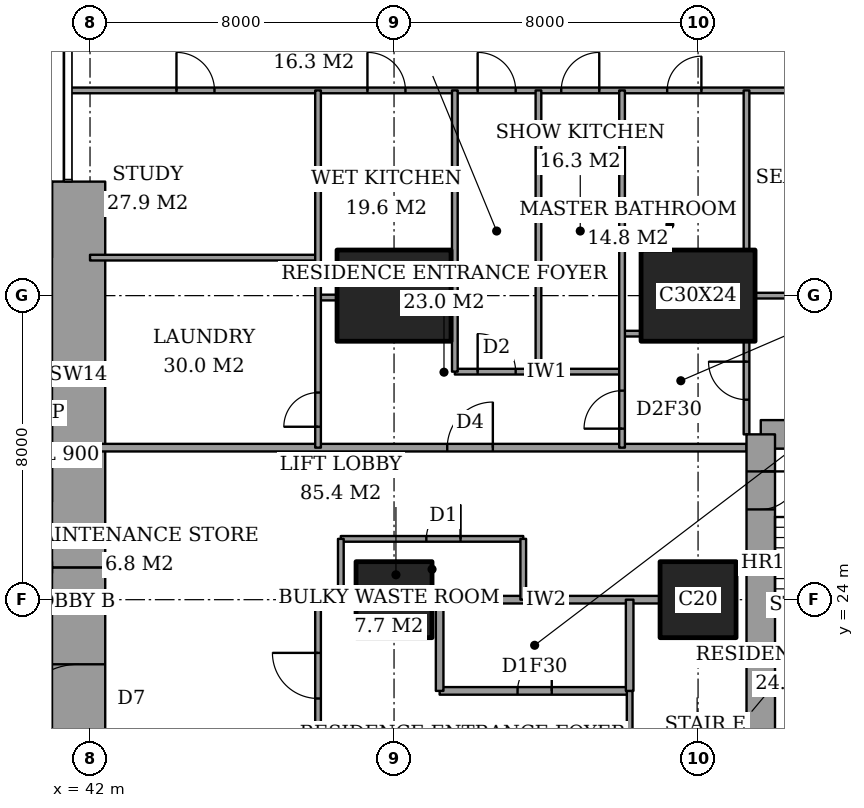
"""IFC4 building model, lengths in metres.
Left out: names, types, materials, properties, quantities, classifications, styles, units other than length and angle.
Written with IfcOpenShell. Run it as: python <this file> out.ifc"""

import sys

from ifc_helpers import new_model, si_unit, direction, frame, frame_2d, origin, origin_2d, place, context, subcontext, project, spatial, rectangle, extrude, element, fill, save


model = new_model("IFC4")
c1 = context("Model", 3, precision=1e-05, world=origin(), true_north=direction((0.0, 1.0)))
c2 = subcontext(c1, "Body", "Model", "MODEL_VIEW")
j1 = project(units=[si_unit("LENGTHUNIT", "METRE"), si_unit("PLANEANGLEUNIT", "RADIAN")], contexts=[c1])
p1 = place(None, origin())
s1 = spatial("IfcSite", under=j1, at=p1, CompositionType="ELEMENT")
p2 = place(p1, origin())
s2 = spatial("IfcBuilding", under=s1, at=p2, CompositionType="ELEMENT")
p3 = place(p2, frame((0.0, 0.0, 107.0)))
s3 = spatial("IfcBuildingStorey", under=s2, at=p3, CompositionType="ELEMENT", Elevation=107.0)
p4 = place(p3, frame((50.0, 24.0, 0.0), z_axis=(0.0, 0.0, 1.0), x_axis=(1.0, 0.0, 0.0)))
e1 = element("IfcColumn", 1, at=p4, inside=s3, PredefinedType="COLUMN", context=c2, shape_type="SweptSolid", body=[
    extrude(rectangle(XDim=2.0, YDim=2.0, at=origin_2d()), origin(), (0.0, 0.0, 1.0), 3.6),
])
p5 = place(p3, frame((50.0, 32.0, 0.0), z_axis=(0.0, 0.0, 1.0), x_axis=(1.0, 0.0, 0.0)))
e2 = element("IfcColumn", 2, at=p5, inside=s3, PredefinedType="COLUMN", context=c2, shape_type="SweptSolid", body=[
    extrude(rectangle(XDim=3.0, YDim=2.4, at=origin_2d()), origin(), (0.0, 0.0, 1.0), 3.6),
])
p6 = place(p3, frame((58.0, 24.0, 0.0), z_axis=(0.0, 0.0, 1.0), x_axis=(1.0, 0.0, 0.0)))
e3 = element("IfcColumn", 3, at=p6, inside=s3, PredefinedType="COLUMN", context=c2, shape_type="SweptSolid", body=[
    extrude(rectangle(XDim=2.0, YDim=2.0, at=origin_2d()), origin(), (0.0, 0.0, 1.0), 3.6),
])
p7 = place(p3, frame((58.0, 32.0, 0.0), z_axis=(0.0, 0.0, 1.0), x_axis=(1.0, 0.0, 0.0)))
e4 = element("IfcColumn", 4, at=p7, inside=s3, PredefinedType="COLUMN", context=c2, shape_type="SweptSolid", body=[
    extrude(rectangle(XDim=3.0, YDim=2.4, at=origin_2d()), origin(), (0.0, 0.0, 1.0), 3.6),
])
p8 = place(p3, frame((41.7, 13.0, 0.0), z_axis=(0.0, 0.0, 1.0), x_axis=(0.0, 1.0, 0.0)))
e5 = element("IfcWall", 5, at=p8, inside=s3, PredefinedType="SHEAR", context=c2, shape_type="SweptSolid", body=[
    extrude(rectangle(XDim=11.85, YDim=1.4, at=frame_2d((5.925, 0.0))), origin(), (0.0, 0.0, 1.0), 3.6),
])
p9 = place(p8, frame((7.5, 0.0, 0.0)))
e6 = element("IfcOpeningElement", 6, at=p9, cuts=e5, PredefinedType="OPENING", context=c2, shape_type="SweptSolid", body=[
    extrude(rectangle(XDim=1.8, YDim=2.4, at=frame_2d((0.9, 1.2))), frame((0.0, 0.71, 0.0), z_axis=(0.0, -1.0, 0.0), x_axis=(1.0, 0.0, 0.0)), (0.0, 0.0, 1.0), 1.42),
])
p10 = place(p3, frame((41.7, 24.85, 0.0), z_axis=(0.0, 0.0, 1.0), x_axis=(0.0, 1.0, 0.0)))
e7 = element("IfcWall", 7, at=p10, inside=s3, PredefinedType="SHEAR", context=c2, shape_type="SweptSolid", body=[
    extrude(rectangle(XDim=10.15, YDim=1.4, at=frame_2d((5.075, 0.0))), origin(), (0.0, 0.0, 1.0), 3.6),
])
p11 = place(p3, frame((64.1, 28.35, 0.0), z_axis=(0.0, 0.0, 1.0), x_axis=(-1.0, 0.0, 0.0)))
e8 = element("IfcWall", 8, at=p11, inside=s3, PredefinedType="SHEAR", context=c2, shape_type="SweptSolid", body=[
    extrude(rectangle(XDim=4.45, YDim=0.75, at=frame_2d((2.225, 0.0))), origin(), (0.0, 0.0, 1.0), 3.6),
])
p12 = place(p3, frame((59.65, 28.35, 0.0), z_axis=(0.0, 0.0, 1.0), x_axis=(0.0, -1.0, 0.0)))
e9 = element("IfcWall", 9, at=p12, inside=s3, PredefinedType="SHEAR", context=c2, shape_type="SweptSolid", body=[
    extrude(rectangle(XDim=8.7, YDim=0.75, at=frame_2d((4.35, 0.0))), origin(), (0.0, 0.0, 1.0), 3.6),
])
p13 = place(p12, frame((0.975, 0.0, 0.0)))
e10 = element("IfcOpeningElement", 10, at=p13, cuts=e9, PredefinedType="OPENING", context=c2, shape_type="SweptSolid", body=[
    extrude(rectangle(XDim=1.0, YDim=2.1, at=frame_2d((0.5, 1.05))), frame((0.0, 0.385, 0.0), z_axis=(0.0, -1.0, 0.0), x_axis=(1.0, 0.0, 0.0)), (0.0, 0.0, 1.0), 0.77),
])
p14 = place(p3, frame((51.2, 21.6, 0.0), z_axis=(0.0, 0.0, 1.0), x_axis=(1.0, 0.0, 0.0)))
e11 = element("IfcWall", 11, at=p14, inside=s3, PredefinedType="PARTITIONING", context=c2, shape_type="SweptSolid", body=[
    extrude(rectangle(XDim=5.0, YDim=0.2, at=frame_2d((2.5, 0.0))), origin(), (0.0, 0.0, 1.0), 3.35),
])
p15 = place(p14, frame((2.05, 0.0, 0.0)))
e12 = element("IfcOpeningElement", 12, at=p15, cuts=e11, PredefinedType="OPENING", context=c2, shape_type="SweptSolid", body=[
    extrude(rectangle(XDim=0.9, YDim=2.1, at=frame_2d((0.45, 1.05))), frame((0.0, 0.11, 0.0), z_axis=(0.0, -1.0, 0.0), x_axis=(1.0, 0.0, 0.0)), (0.0, 0.0, 1.0), 0.22),
])
p16 = place(p3, frame((48.0, 24.0, 0.0), z_axis=(0.0, 0.0, 1.0), x_axis=(1.0, 0.0, 0.0)))
e13 = element("IfcWall", 13, at=p16, inside=s3, PredefinedType="PARTITIONING", context=c2, shape_type="SweptSolid", body=[
    extrude(rectangle(XDim=1.0, YDim=0.2, at=frame_2d((0.5, 0.0))), origin(), (0.0, 0.0, 1.0), 3.35),
])
p17 = place(p3, frame((51.0, 24.0, 0.0), z_axis=(0.0, 0.0, 1.0), x_axis=(1.0, 0.0, 0.0)))
e14 = element("IfcWall", 14, at=p17, inside=s3, PredefinedType="PARTITIONING", context=c2, shape_type="SweptSolid", body=[
    extrude(rectangle(XDim=6.0, YDim=0.2, at=frame_2d((3.0, 0.0))), origin(), (0.0, 0.0, 1.0), 3.35),
])
p18 = place(p3, frame((48.6, 25.6, 0.0), z_axis=(0.0, 0.0, 1.0), x_axis=(1.0, 0.0, 0.0)))
e15 = element("IfcWall", 15, at=p18, inside=s3, PredefinedType="PARTITIONING", context=c2, shape_type="SweptSolid", body=[
    extrude(rectangle(XDim=4.8, YDim=0.15, at=frame_2d((2.4, 0.0))), origin(), (0.0, 0.0, 1.0), 3.35),
])
p19 = place(p18, frame((2.25, 0.0, 0.0)))
e16 = element("IfcOpeningElement", 16, at=p19, cuts=e15, PredefinedType="OPENING", context=c2, shape_type="SweptSolid", body=[
    extrude(rectangle(XDim=0.9, YDim=2.1, at=frame_2d((0.45, 1.05))), frame((0.0, 0.085, 0.0), z_axis=(0.0, -1.0, 0.0), x_axis=(1.0, 0.0, 0.0)), (0.0, 0.0, 1.0), 0.17),
])
p20 = place(p3, frame((42.0, 28.0, 0.0), z_axis=(0.0, 0.0, 1.0), x_axis=(1.0, 0.0, 0.0)))
e17 = element("IfcWall", 17, at=p20, inside=s3, PredefinedType="PARTITIONING", context=c2, shape_type="SweptSolid", body=[
    extrude(rectangle(XDim=17.275, YDim=0.2, at=frame_2d((8.637, 0.0))), origin(), (0.0, 0.0, 1.0), 3.35),
])
p21 = place(p20, frame((9.4, 0.0, 0.0)))
e18 = element("IfcOpeningElement", 18, at=p21, cuts=e17, PredefinedType="OPENING", context=c2, shape_type="SweptSolid", body=[
    extrude(rectangle(XDim=1.2, YDim=2.4, at=frame_2d((0.6, 1.2))), frame((0.0, 0.11, 0.0), z_axis=(0.0, -1.0, 0.0), x_axis=(1.0, 0.0, 0.0)), (0.0, 0.0, 1.0), 0.22),
])
p22 = place(p3, frame((51.6, 30.0, 0.0), z_axis=(0.0, 0.0, 1.0), x_axis=(1.0, 0.0, 0.0)))
e19 = element("IfcWall", 19, at=p22, inside=s3, PredefinedType="PARTITIONING", context=c2, shape_type="SweptSolid", body=[
    extrude(rectangle(XDim=4.4, YDim=0.15, at=frame_2d((2.2, 0.0))), origin(), (0.0, 0.0, 1.0), 3.35),
])
p23 = place(p22, frame((0.6, 0.0, 0.0)))
e20 = element("IfcOpeningElement", 20, at=p23, cuts=e19, PredefinedType="OPENING", context=c2, shape_type="SweptSolid", body=[
    extrude(rectangle(XDim=1.0, YDim=2.1, at=frame_2d((0.5, 1.05))), frame((0.0, 0.085, 0.0), z_axis=(0.0, -1.0, 0.0), x_axis=(1.0, 0.0, 0.0)), (0.0, 0.0, 1.0), 0.17),
])
p24 = place(p3, frame((56.0, 31.0, 0.0), z_axis=(0.0, 0.0, 1.0), x_axis=(1.0, 0.0, 0.0)))
e21 = element("IfcWall", 21, at=p24, inside=s3, PredefinedType="PARTITIONING", context=c2, shape_type="SweptSolid", body=[
    extrude(rectangle(XDim=0.5, YDim=0.15, at=frame_2d((0.25, 0.0))), origin(), (0.0, 0.0, 1.0), 3.35),
])
p25 = place(p3, frame((48.0, 31.95, 0.0), z_axis=(0.0, 0.0, 1.0), x_axis=(1.0, 0.0, 0.0)))
e22 = element("IfcWall", 22, at=p25, inside=s3, PredefinedType="PARTITIONING", context=c2, shape_type="SweptSolid", body=[
    extrude(rectangle(XDim=0.5, YDim=0.15, at=frame_2d((0.25, 0.0))), origin(), (0.0, 0.0, 1.0), 2.634),
])
p26 = place(p3, frame((59.5, 32.0, 0.0), z_axis=(0.0, 0.0, 1.0), x_axis=(1.0, 0.0, 0.0)))
e23 = element("IfcWall", 23, at=p26, inside=s3, PredefinedType="PARTITIONING", context=c2, shape_type="SweptSolid", body=[
    extrude(rectangle(XDim=5.15, YDim=0.15, at=frame_2d((2.575, 0.0))), origin(), (0.0, 0.0, 1.0), 2.634),
])
p27 = place(p3, frame((42.0, 33.0, 0.0), z_axis=(0.0, 0.0, 1.0), x_axis=(1.0, 0.0, 0.0)))
e24 = element("IfcWall", 24, at=p27, inside=s3, PredefinedType="PARTITIONING", context=c2, shape_type="SweptSolid", body=[
    extrude(rectangle(XDim=6.0, YDim=0.15, at=frame_2d((3.0, 0.0))), origin(), (0.0, 0.0, 1.0), 3.35),
])
p28 = place(p3, frame((41.439, 37.4, 0.0), z_axis=(0.0, 0.0, 1.0), x_axis=(1.0, 0.0, 0.0)))
e25 = element("IfcWall", 25, at=p28, inside=s3, PredefinedType="PARTITIONING", context=c2, shape_type="SweptSolid", body=[
    extrude(rectangle(XDim=25.011, YDim=0.15, at=frame_2d((12.505, 0.0))), origin(), (0.0, 0.0, 1.0), 3.35),
])
p29 = place(p28, frame((10.761, 0.0, 0.0)))
e26 = element("IfcOpeningElement", 26, at=p29, cuts=e25, PredefinedType="OPENING", context=c2, shape_type="SweptSolid", body=[
    extrude(rectangle(XDim=1.0, YDim=2.1, at=frame_2d((0.5, 1.05))), frame((0.0, 0.085, 0.0), z_axis=(0.0, -1.0, 0.0), x_axis=(1.0, 0.0, 0.0)), (0.0, 0.0, 1.0), 0.17),
])
p30 = place(p28, frame((20.924, 0.0, 0.0)))
e27 = element("IfcOpeningElement", 27, at=p30, cuts=e25, PredefinedType="OPENING", context=c2, shape_type="SweptSolid", body=[
    extrude(rectangle(XDim=1.0, YDim=2.1, at=frame_2d((0.5, 1.05))), frame((0.0, 0.085, 0.0), z_axis=(0.0, -1.0, 0.0), x_axis=(1.0, 0.0, 0.0)), (0.0, 0.0, 1.0), 0.17),
])
p31 = place(p28, frame((15.749, 0.0, 0.0)))
e28 = element("IfcOpeningElement", 28, at=p31, cuts=e25, PredefinedType="OPENING", context=c2, shape_type="SweptSolid", body=[
    extrude(rectangle(XDim=0.9, YDim=2.1, at=frame_2d((0.45, 1.05))), frame((0.0, 0.085, 0.0), z_axis=(0.0, -1.0, 0.0), x_axis=(1.0, 0.0, 0.0)), (0.0, 0.0, 1.0), 0.17),
])
p32 = place(p28, frame((12.961, 0.0, 0.0)))
e29 = element("IfcOpeningElement", 29, at=p32, cuts=e25, PredefinedType="OPENING", context=c2, shape_type="SweptSolid", body=[
    extrude(rectangle(XDim=1.0, YDim=2.1, at=frame_2d((0.5, 1.05))), frame((0.0, 0.085, 0.0), z_axis=(0.0, -1.0, 0.0), x_axis=(1.0, 0.0, 0.0)), (0.0, 0.0, 1.0), 0.17),
])
p33 = place(p28, frame((7.861, 0.0, 0.0)))
e30 = element("IfcOpeningElement", 30, at=p33, cuts=e25, PredefinedType="OPENING", context=c2, shape_type="SweptSolid", body=[
    extrude(rectangle(XDim=1.0, YDim=2.1, at=frame_2d((0.5, 1.05))), frame((0.0, 0.085, 0.0), z_axis=(0.0, -1.0, 0.0), x_axis=(1.0, 0.0, 0.0)), (0.0, 0.0, 1.0), 0.17),
])
p34 = place(p28, frame((2.836, 0.0, 0.0)))
e31 = element("IfcOpeningElement", 31, at=p34, cuts=e25, PredefinedType="OPENING", context=c2, shape_type="SweptSolid", body=[
    extrude(rectangle(XDim=1.0, YDim=2.1, at=frame_2d((0.5, 1.05))), frame((0.0, 0.085, 0.0), z_axis=(0.0, -1.0, 0.0), x_axis=(1.0, 0.0, 0.0)), (0.0, 0.0, 1.0), 0.17),
])
p35 = place(p3, frame((48.0, 10.6, 0.0), z_axis=(0.0, 0.0, 1.0), x_axis=(0.0, 1.0, 0.0)))
e32 = element("IfcWall", 32, at=p35, inside=s3, PredefinedType="PARTITIONING", context=c2, shape_type="SweptSolid", body=[
    extrude(rectangle(XDim=13.4, YDim=0.15, at=frame_2d((6.7, 0.0))), origin(), (0.0, 0.0, 1.0), 3.35),
])
p36 = place(p35, frame((10.8, 0.0, 0.0)))
e33 = element("IfcOpeningElement", 33, at=p36, cuts=e32, PredefinedType="OPENING", context=c2, shape_type="SweptSolid", body=[
    extrude(rectangle(XDim=1.2, YDim=2.4, at=frame_2d((0.6, 1.2))), frame((0.0, 0.085, 0.0), z_axis=(0.0, -1.0, 0.0), x_axis=(1.0, 0.0, 0.0)), (0.0, 0.0, 1.0), 0.17),
])
p37 = place(p35, frame((6.7, 0.0, 0.0)))
e34 = element("IfcOpeningElement", 34, at=p37, cuts=e32, PredefinedType="OPENING", context=c2, shape_type="SweptSolid", body=[
    extrude(rectangle(XDim=0.9, YDim=2.1, at=frame_2d((0.45, 1.05))), frame((0.0, 0.085, 0.0), z_axis=(0.0, -1.0, 0.0), x_axis=(1.0, 0.0, 0.0)), (0.0, 0.0, 1.0), 0.17),
])
p38 = place(p3, frame((48.0, 28.0, 0.0), z_axis=(0.0, 0.0, 1.0), x_axis=(0.0, 1.0, 0.0)))
e35 = element("IfcWall", 35, at=p38, inside=s3, PredefinedType="PARTITIONING", context=c2, shape_type="SweptSolid", body=[
    extrude(rectangle(XDim=9.4, YDim=0.15, at=frame_2d((4.7, 0.0))), origin(), (0.0, 0.0, 1.0), 3.35),
])
p39 = place(p38, frame((0.55, 0.0, 0.0)))
e36 = element("IfcOpeningElement", 36, at=p39, cuts=e35, PredefinedType="OPENING", context=c2, shape_type="SweptSolid", body=[
    extrude(rectangle(XDim=0.9, YDim=2.1, at=frame_2d((0.45, 1.05))), frame((0.0, 0.085, 0.0), z_axis=(0.0, -1.0, 0.0), x_axis=(1.0, 0.0, 0.0)), (0.0, 0.0, 1.0), 0.17),
])
p40 = place(p3, frame((48.6, 24.0, 0.0), z_axis=(0.0, 0.0, 1.0), x_axis=(0.0, 1.0, 0.0)))
e37 = element("IfcWall", 37, at=p40, inside=s3, PredefinedType="PARTITIONING", context=c2, shape_type="SweptSolid", body=[
    extrude(rectangle(XDim=1.6, YDim=0.15, at=frame_2d((0.8, 0.0))), origin(), (0.0, 0.0, 1.0), 3.35),
])
p41 = place(p3, frame((51.2, 21.6, 0.0), z_axis=(0.0, 0.0, 1.0), x_axis=(0.0, 1.0, 0.0)))
e38 = element("IfcWall", 38, at=p41, inside=s3, PredefinedType="PARTITIONING", context=c2, shape_type="SweptSolid", body=[
    extrude(rectangle(XDim=2.4, YDim=0.2, at=frame_2d((1.2, 0.0))), origin(), (0.0, 0.0, 1.0), 3.35),
])
p42 = place(p3, frame((51.6, 30.0, 0.0), z_axis=(0.0, 0.0, 1.0), x_axis=(0.0, 1.0, 0.0)))
e39 = element("IfcWall", 39, at=p42, inside=s3, PredefinedType="PARTITIONING", context=c2, shape_type="SweptSolid", body=[
    extrude(rectangle(XDim=7.4, YDim=0.15, at=frame_2d((3.7, 0.0))), origin(), (0.0, 0.0, 1.0), 3.35),
])
p43 = place(p3, frame((53.4, 24.0, 0.0), z_axis=(0.0, 0.0, 1.0), x_axis=(0.0, 1.0, 0.0)))
e40 = element("IfcWall", 40, at=p43, inside=s3, PredefinedType="PARTITIONING", context=c2, shape_type="SweptSolid", body=[
    extrude(rectangle(XDim=1.6, YDim=0.15, at=frame_2d((0.8, 0.0))), origin(), (0.0, 0.0, 1.0), 3.35),
])
p44 = place(p3, frame((53.8, 30.0, 0.0), z_axis=(0.0, 0.0, 1.0), x_axis=(0.0, 1.0, 0.0)))
e41 = element("IfcWall", 41, at=p44, inside=s3, PredefinedType="PARTITIONING", context=c2, shape_type="SweptSolid", body=[
    extrude(rectangle(XDim=7.4, YDim=0.15, at=frame_2d((3.7, 0.0))), origin(), (0.0, 0.0, 1.0), 3.35),
])
p45 = place(p3, frame((56.0, 28.0, 0.0), z_axis=(0.0, 0.0, 1.0), x_axis=(0.0, 1.0, 0.0)))
e42 = element("IfcWall", 42, at=p45, inside=s3, PredefinedType="PARTITIONING", context=c2, shape_type="SweptSolid", body=[
    extrude(rectangle(XDim=9.4, YDim=0.15, at=frame_2d((4.7, 0.0))), origin(), (0.0, 0.0, 1.0), 3.35),
])
p46 = place(p45, frame((0.5, 0.0, 0.0)))
e43 = element("IfcOpeningElement", 43, at=p46, cuts=e42, PredefinedType="OPENING", context=c2, shape_type="SweptSolid", body=[
    extrude(rectangle(XDim=1.0, YDim=2.1, at=frame_2d((0.5, 1.05))), frame((0.0, 0.085, 0.0), z_axis=(0.0, -1.0, 0.0), x_axis=(1.0, 0.0, 0.0)), (0.0, 0.0, 1.0), 0.17),
])
p47 = place(p3, frame((56.2, 21.6, 0.0), z_axis=(0.0, 0.0, 1.0), x_axis=(0.0, 1.0, 0.0)))
e44 = element("IfcWall", 44, at=p47, inside=s3, PredefinedType="PARTITIONING", context=c2, shape_type="SweptSolid", body=[
    extrude(rectangle(XDim=2.4, YDim=0.2, at=frame_2d((1.2, 0.0))), origin(), (0.0, 0.0, 1.0), 3.35),
])
p48 = place(p3, frame((56.2, 10.6, 0.0), z_axis=(0.0, 0.0, 1.0), x_axis=(0.0, 1.0, 0.0)))
e45 = element("IfcWall", 45, at=p48, inside=s3, PredefinedType="PARTITIONING", context=c2, shape_type="SweptSolid", body=[
    extrude(rectangle(XDim=11.0, YDim=0.15, at=frame_2d((5.5, 0.0))), origin(), (0.0, 0.0, 1.0), 3.35),
])
p49 = place(p48, frame((7.0, 0.0, 0.0)))
e46 = element("IfcOpeningElement", 46, at=p49, cuts=e45, PredefinedType="OPENING", context=c2, shape_type="SweptSolid", body=[
    extrude(rectangle(XDim=1.0, YDim=2.1, at=frame_2d((0.5, 1.05))), frame((0.0, 0.085, 0.0), z_axis=(0.0, -1.0, 0.0), x_axis=(1.0, 0.0, 0.0)), (0.0, 0.0, 1.0), 0.17),
])
p50 = place(p3, frame((59.275, 28.35, 0.0), z_axis=(0.0, 0.0, 1.0), x_axis=(0.0, 1.0, 0.0)))
e47 = element("IfcWall", 47, at=p50, inside=s3, PredefinedType="PARTITIONING", context=c2, shape_type="SweptSolid", body=[
    extrude(rectangle(XDim=2.45, YDim=0.15, at=frame_2d((1.225, 0.0))), origin(), (0.0, 0.0, 1.0), 3.35),
])
p51 = place(p50, frame((0.913, 0.0, 0.0)))
e48 = element("IfcOpeningElement", 48, at=p51, cuts=e47, PredefinedType="OPENING", context=c2, shape_type="SweptSolid", body=[
    extrude(rectangle(XDim=1.0, YDim=2.1, at=frame_2d((0.5, 1.05))), frame((0.0, 0.085, 0.0), z_axis=(0.0, -1.0, 0.0), x_axis=(1.0, 0.0, 0.0)), (0.0, 0.0, 1.0), 0.17),
])
p52 = place(p3, frame((59.275, 33.2, 0.0), z_axis=(0.0, 0.0, 1.0), x_axis=(0.0, 1.0, 0.0)))
e49 = element("IfcWall", 49, at=p52, inside=s3, PredefinedType="PARTITIONING", context=c2, shape_type="SweptSolid", body=[
    extrude(rectangle(XDim=4.2, YDim=0.15, at=frame_2d((2.1, 0.0))), origin(), (0.0, 0.0, 1.0), 3.35),
])
p53 = place(p15, origin())
e50 = element("IfcDoor", 50, at=p53, inside=s3, OperationType="SINGLE_SWING_LEFT", PredefinedType="DOOR", context=c2, shape_type="SweptSolid", body=[
    extrude(rectangle(XDim=0.9, YDim=2.1, at=frame_2d((0.45, 1.05))), frame((0.0, 0.025, 0.0), z_axis=(0.0, -1.0, 0.0), x_axis=(1.0, 0.0, 0.0)), (0.0, 0.0, 1.0), 0.05),
])
fill(e12, e50)
p54 = place(p36, origin())
e51 = element("IfcDoor", 51, at=p54, inside=s3, OperationType="SINGLE_SWING_LEFT", PredefinedType="DOOR", context=c2, shape_type="SweptSolid", body=[
    extrude(rectangle(XDim=1.2, YDim=2.4, at=frame_2d((0.6, 1.2))), frame((0.0, 0.025, 0.0), z_axis=(0.0, -1.0, 0.0), x_axis=(1.0, 0.0, 0.0)), (0.0, 0.0, 1.0), 0.05),
])
fill(e33, e51)
p55 = place(p29, origin())
e52 = element("IfcDoor", 52, at=p55, inside=s3, OperationType="SINGLE_SWING_RIGHT", PredefinedType="DOOR", context=c2, shape_type="SweptSolid", body=[
    extrude(rectangle(XDim=1.0, YDim=2.1, at=frame_2d((0.5, 1.05))), frame((0.0, 0.025, 0.0), z_axis=(0.0, -1.0, 0.0), x_axis=(1.0, 0.0, 0.0)), (0.0, 0.0, 1.0), 0.05),
])
fill(e26, e52)
p56 = place(p51, origin())
e53 = element("IfcDoor", 53, at=p56, inside=s3, OperationType="SINGLE_SWING_LEFT", PredefinedType="DOOR", context=c2, shape_type="SweptSolid", body=[
    extrude(rectangle(XDim=1.0, YDim=2.1, at=frame_2d((0.5, 1.05))), frame((0.0, 0.025, 0.0), z_axis=(0.0, -1.0, 0.0), x_axis=(1.0, 0.0, 0.0)), (0.0, 0.0, 1.0), 0.05),
])
fill(e48, e53)
p57 = place(p31, origin())
e54 = element("IfcDoor", 54, at=p57, inside=s3, OperationType="SINGLE_SWING_LEFT", PredefinedType="DOOR", context=c2, shape_type="SweptSolid", body=[
    extrude(rectangle(XDim=0.9, YDim=2.1, at=frame_2d((0.45, 1.05))), frame((0.0, 0.025, 0.0), z_axis=(0.0, -1.0, 0.0), x_axis=(1.0, 0.0, 0.0)), (0.0, 0.0, 1.0), 0.05),
])
fill(e28, e54)
p58 = place(p46, origin())
e55 = element("IfcDoor", 55, at=p58, inside=s3, OperationType="SINGLE_SWING_RIGHT", PredefinedType="DOOR", context=c2, shape_type="SweptSolid", body=[
    extrude(rectangle(XDim=1.0, YDim=2.1, at=frame_2d((0.5, 1.05))), frame((0.0, 0.025, 0.0), z_axis=(0.0, -1.0, 0.0), x_axis=(1.0, 0.0, 0.0)), (0.0, 0.0, 1.0), 0.05),
])
fill(e43, e55)
p59 = place(p21, origin())
e56 = element("IfcDoor", 56, at=p59, inside=s3, OperationType="SINGLE_SWING_LEFT", PredefinedType="DOOR", context=c2, shape_type="SweptSolid", body=[
    extrude(rectangle(XDim=1.2, YDim=2.4, at=frame_2d((0.6, 1.2))), frame((0.0, 0.025, 0.0), z_axis=(0.0, -1.0, 0.0), x_axis=(1.0, 0.0, 0.0)), (0.0, 0.0, 1.0), 0.05),
])
fill(e18, e56)
p60 = place(p32, origin())
e57 = element("IfcDoor", 57, at=p60, inside=s3, OperationType="SINGLE_SWING_LEFT", PredefinedType="DOOR", context=c2, shape_type="SweptSolid", body=[
    extrude(rectangle(XDim=1.0, YDim=2.1, at=frame_2d((0.5, 1.05))), frame((0.0, 0.025, 0.0), z_axis=(0.0, -1.0, 0.0), x_axis=(1.0, 0.0, 0.0)), (0.0, 0.0, 1.0), 0.05),
])
fill(e29, e57)
p61 = place(p23, origin())
e58 = element("IfcDoor", 58, at=p61, inside=s3, OperationType="SINGLE_SWING_RIGHT", PredefinedType="DOOR", context=c2, shape_type="SweptSolid", body=[
    extrude(rectangle(XDim=1.0, YDim=2.1, at=frame_2d((0.5, 1.05))), frame((0.0, 0.025, 0.0), z_axis=(0.0, -1.0, 0.0), x_axis=(1.0, 0.0, 0.0)), (0.0, 0.0, 1.0), 0.05),
])
fill(e20, e58)
p62 = place(p33, origin())
e59 = element("IfcDoor", 59, at=p62, inside=s3, OperationType="SINGLE_SWING_RIGHT", PredefinedType="DOOR", context=c2, shape_type="SweptSolid", body=[
    extrude(rectangle(XDim=1.0, YDim=2.1, at=frame_2d((0.5, 1.05))), frame((0.0, 0.025, 0.0), z_axis=(0.0, -1.0, 0.0), x_axis=(1.0, 0.0, 0.0)), (0.0, 0.0, 1.0), 0.05),
])
fill(e30, e59)
p63 = place(p34, origin())
e60 = element("IfcDoor", 60, at=p63, inside=s3, OperationType="SINGLE_SWING_RIGHT", PredefinedType="DOOR", context=c2, shape_type="SweptSolid", body=[
    extrude(rectangle(XDim=1.0, YDim=2.1, at=frame_2d((0.5, 1.05))), frame((0.0, 0.025, 0.0), z_axis=(0.0, -1.0, 0.0), x_axis=(1.0, 0.0, 0.0)), (0.0, 0.0, 1.0), 0.05),
])
fill(e31, e60)
p64 = place(p39, origin())
e61 = element("IfcDoor", 61, at=p64, inside=s3, OperationType="SINGLE_SWING_RIGHT", PredefinedType="DOOR", context=c2, shape_type="SweptSolid", body=[
    extrude(rectangle(XDim=0.9, YDim=2.1, at=frame_2d((0.45, 1.05))), frame((0.0, 0.025, 0.0), z_axis=(0.0, -1.0, 0.0), x_axis=(1.0, 0.0, 0.0)), (0.0, 0.0, 1.0), 0.05),
])
fill(e36, e61)
p65 = place(p19, origin())
e62 = element("IfcDoor", 62, at=p65, inside=s3, OperationType="SINGLE_SWING_LEFT", PredefinedType="DOOR", context=c2, shape_type="SweptSolid", body=[
    extrude(rectangle(XDim=0.9, YDim=2.1, at=frame_2d((0.45, 1.05))), frame((0.0, 0.025, 0.0), z_axis=(0.0, -1.0, 0.0), x_axis=(1.0, 0.0, 0.0)), (0.0, 0.0, 1.0), 0.05),
])
fill(e16, e62)
p66 = place(p9, origin())
e63 = element("IfcDoor", 63, at=p66, inside=s3, OperationType="DOUBLE_DOOR_DOUBLE_SWING", PredefinedType="DOOR", context=c2, shape_type="SweptSolid", body=[
    extrude(rectangle(XDim=1.8, YDim=2.4, at=frame_2d((0.9, 1.2))), frame((0.0, 0.025, 0.0), z_axis=(0.0, -1.0, 0.0), x_axis=(1.0, 0.0, 0.0)), (0.0, 0.0, 1.0), 0.05),
])
fill(e6, e63)
p67 = place(p13, origin())
e64 = element("IfcDoor", 64, at=p67, inside=s3, OperationType="SINGLE_SWING_RIGHT", PredefinedType="DOOR", context=c2, shape_type="SweptSolid", body=[
    extrude(rectangle(XDim=1.0, YDim=2.1, at=frame_2d((0.5, 1.05))), frame((0.0, 0.025, 0.0), z_axis=(0.0, -1.0, 0.0), x_axis=(1.0, 0.0, 0.0)), (0.0, 0.0, 1.0), 0.05),
])
fill(e10, e64)
save(model, sys.argv[1])
